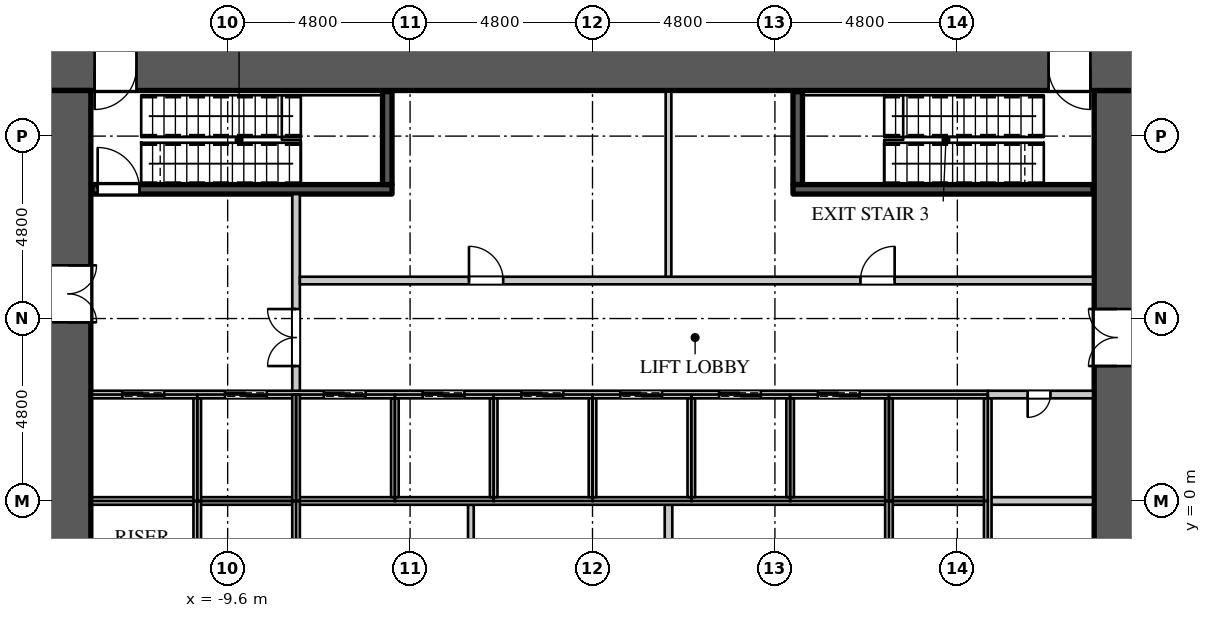
"""IFC4 building model, lengths in metres.
Left out: names, types, materials, properties, quantities, classifications, styles, units other than length and angle.
Written with IfcOpenShell. Run it as: python <this file> out.ifc"""

import sys

from ifc_helpers import new_model, si_unit, direction, frame, frame_2d, origin, place, context, subcontext, project, spatial, rectangle, extrude, element, fill, save


model = new_model("IFC4")
c1 = context("Model", 3, precision=1e-05, world=origin(), true_north=direction((0.0, 1.0)))
c2 = subcontext(c1, "Body", "Model", "MODEL_VIEW")
j1 = project(units=[si_unit("LENGTHUNIT", "METRE"), si_unit("PLANEANGLEUNIT", "RADIAN")], contexts=[c1])
p1 = place(None, origin())
s1 = spatial("IfcSite", under=j1, at=p1, CompositionType="ELEMENT")
p2 = place(p1, origin())
s2 = spatial("IfcBuilding", under=s1, at=p2, CompositionType="ELEMENT")
p3 = place(p2, frame((0.0, 0.0, 16.0)))
s3 = spatial("IfcBuildingStorey", under=s2, at=p3, CompositionType="ELEMENT", Elevation=16.0)
p4 = place(p3, frame((-14.4, 11.4, 0.0), z_axis=(0.0, 0.0, 1.0), x_axis=(1.0, 0.0, 0.0)))
e1 = element("IfcWall", 1, at=p4, inside=s3, PredefinedType="SHEAR", context=c2, shape_type="SweptSolid", body=[
    extrude(rectangle(XDim=28.8, YDim=1.2, at=frame_2d((14.4, 0.0))), origin(), (0.0, 0.0, 1.0), 5.0),
])
p5 = place(p4, frame((1.3, 0.0, 0.0)))
e2 = element("IfcOpeningElement", 2, at=p5, cuts=e1, PredefinedType="OPENING", context=c2, shape_type="SweptSolid", body=[
    extrude(rectangle(XDim=1.1, YDim=2.2, at=frame_2d((0.55, 1.1))), frame((0.0, 0.61, 0.0), z_axis=(0.0, -1.0, 0.0), x_axis=(1.0, 0.0, 0.0)), (0.0, 0.0, 1.0), 1.22),
])
p6 = place(p4, frame((26.4, 0.0, 0.0)))
e3 = element("IfcOpeningElement", 3, at=p6, cuts=e1, PredefinedType="OPENING", context=c2, shape_type="SweptSolid", body=[
    extrude(rectangle(XDim=1.1, YDim=2.2, at=frame_2d((0.55, 1.1))), frame((0.0, 0.61, 0.0), z_axis=(0.0, -1.0, 0.0), x_axis=(1.0, 0.0, 0.0)), (0.0, 0.0, 1.0), 1.22),
])
p7 = place(p3, frame((13.8, -10.8, 0.0), z_axis=(0.0, 0.0, 1.0), x_axis=(0.0, 1.0, 0.0)))
e4 = element("IfcWall", 4, at=p7, inside=s3, PredefinedType="SHEAR", context=c2, shape_type="SweptSolid", body=[
    extrude(rectangle(XDim=21.6, YDim=1.2, at=frame_2d((10.8, 0.0))), origin(), (0.0, 0.0, 1.0), 5.0),
])
p8 = place(p7, frame((14.35, 0.0, 0.0)))
e5 = element("IfcOpeningElement", 5, at=p8, cuts=e4, PredefinedType="OPENING", context=c2, shape_type="SweptSolid", body=[
    extrude(rectangle(XDim=1.5, YDim=2.4, at=frame_2d((0.75, 1.2))), frame((0.0, 0.61, 0.0), z_axis=(0.0, -1.0, 0.0), x_axis=(1.0, 0.0, 0.0)), (0.0, 0.0, 1.0), 1.22),
])
p9 = place(p7, frame((5.75, 0.0, 0.0)))
e6 = element("IfcOpeningElement", 6, at=p9, cuts=e4, PredefinedType="OPENING", context=c2, shape_type="SweptSolid", body=[
    extrude(rectangle(XDim=1.5, YDim=2.4, at=frame_2d((0.75, 1.2))), frame((0.0, 0.61, 0.0), z_axis=(0.0, -1.0, 0.0), x_axis=(1.0, 0.0, 0.0)), (0.0, 0.0, 1.0), 1.22),
])
p10 = place(p3, frame((-13.8, -10.8, 0.0), z_axis=(0.0, 0.0, 1.0), x_axis=(0.0, 1.0, 0.0)))
e7 = element("IfcWall", 7, at=p10, inside=s3, PredefinedType="SHEAR", context=c2, shape_type="SweptSolid", body=[
    extrude(rectangle(XDim=21.6, YDim=1.2, at=frame_2d((10.8, 0.0))), origin(), (0.0, 0.0, 1.0), 5.0),
])
p11 = place(p10, frame((15.5, 0.0, 0.0)))
e8 = element("IfcOpeningElement", 8, at=p11, cuts=e7, PredefinedType="OPENING", context=c2, shape_type="SweptSolid", body=[
    extrude(rectangle(XDim=1.5, YDim=2.4, at=frame_2d((0.75, 1.2))), frame((0.0, 0.61, 0.0), z_axis=(0.0, -1.0, 0.0), x_axis=(1.0, 0.0, 0.0)), (0.0, 0.0, 1.0), 1.22),
])
p12 = place(p10, frame((4.5, 0.0, 0.0)))
e9 = element("IfcOpeningElement", 9, at=p12, cuts=e7, PredefinedType="OPENING", context=c2, shape_type="SweptSolid", body=[
    extrude(rectangle(XDim=1.5, YDim=2.4, at=frame_2d((0.75, 1.2))), frame((0.0, 0.61, 0.0), z_axis=(0.0, -1.0, 0.0), x_axis=(1.0, 0.0, 0.0)), (0.0, 0.0, 1.0), 1.22),
])
p13 = place(p3, frame((-7.8, 2.8, 0.0), z_axis=(0.0, 0.0, 1.0), x_axis=(0.0, 1.0, 0.0)))
e10 = element("IfcWall", 10, at=p13, inside=s3, PredefinedType="PARTITIONING", context=c2, shape_type="SweptSolid", body=[
    extrude(rectangle(XDim=5.275, YDim=0.2, at=frame_2d((2.637, 0.0))), origin(), (0.0, 0.0, 1.0), 4.4),
])
p14 = place(p13, frame((0.75, 0.0, 0.0)))
e11 = element("IfcOpeningElement", 11, at=p14, cuts=e10, PredefinedType="OPENING", context=c2, shape_type="SweptSolid", body=[
    extrude(rectangle(XDim=1.5, YDim=2.4, at=frame_2d((0.75, 1.2))), frame((0.0, 0.11, 0.0), z_axis=(0.0, -1.0, 0.0), x_axis=(1.0, 0.0, 0.0)), (0.0, 0.0, 1.0), 0.22),
])
p15 = place(p3, frame((-7.7, 5.8, 0.0), z_axis=(0.0, 0.0, 1.0), x_axis=(1.0, 0.0, 0.0)))
e12 = element("IfcWall", 12, at=p15, inside=s3, PredefinedType="PARTITIONING", context=c2, shape_type="SweptSolid", body=[
    extrude(rectangle(XDim=20.87, YDim=0.2, at=frame_2d((10.435, 0.0))), origin(), (0.0, 0.0, 1.0), 4.4),
])
p16 = place(p15, frame((4.45, 0.0, 0.0)))
e13 = element("IfcOpeningElement", 13, at=p16, cuts=e12, PredefinedType="OPENING", context=c2, shape_type="SweptSolid", body=[
    extrude(rectangle(XDim=0.9, YDim=2.2, at=frame_2d((0.45, 1.1))), frame((0.0, 0.11, 0.0), z_axis=(0.0, -1.0, 0.0), x_axis=(1.0, 0.0, 0.0)), (0.0, 0.0, 1.0), 0.22),
])
p17 = place(p15, frame((14.75, 0.0, 0.0)))
e14 = element("IfcOpeningElement", 14, at=p17, cuts=e12, PredefinedType="OPENING", context=c2, shape_type="SweptSolid", body=[
    extrude(rectangle(XDim=0.9, YDim=2.2, at=frame_2d((0.45, 1.1))), frame((0.0, 0.11, 0.0), z_axis=(0.0, -1.0, 0.0), x_axis=(1.0, 0.0, 0.0)), (0.0, 0.0, 1.0), 0.22),
])
p18 = place(p3, frame((-3.2, -2.7, 0.0), z_axis=(0.0, 0.0, 1.0), x_axis=(0.0, 1.0, 0.0)))
e15 = element("IfcWall", 15, at=p18, inside=s3, PredefinedType="PARTITIONING", context=c2, shape_type="SweptSolid", body=[
    extrude(rectangle(XDim=2.6, YDim=0.15, at=frame_2d((1.3, 0.0))), origin(), (0.0, 0.0, 1.0), 4.4),
])
p19 = place(p3, frame((2.0, 5.9, 0.0), z_axis=(0.0, 0.0, 1.0), x_axis=(0.0, 1.0, 0.0)))
e16 = element("IfcWall", 16, at=p19, inside=s3, PredefinedType="PARTITIONING", context=c2, shape_type="SweptSolid", body=[
    extrude(rectangle(XDim=4.87, YDim=0.15, at=frame_2d((2.435, 0.0))), origin(), (0.0, 0.0, 1.0), 4.4),
])
p20 = place(p3, frame((2.0, -2.7, 0.0), z_axis=(0.0, 0.0, 1.0), x_axis=(0.0, 1.0, 0.0)))
e17 = element("IfcWall", 17, at=p20, inside=s3, PredefinedType="PARTITIONING", context=c2, shape_type="SweptSolid", body=[
    extrude(rectangle(XDim=2.6, YDim=0.2, at=frame_2d((1.3, 0.0))), origin(), (0.0, 0.0, 1.0), 4.4),
])
p21 = place(p3, frame((10.4, 2.8, 0.0), z_axis=(0.0, 0.0, 1.0), x_axis=(1.0, 0.0, 0.0)))
e18 = element("IfcWall", 18, at=p21, inside=s3, PredefinedType="PARTITIONING", context=c2, shape_type="SweptSolid", body=[
    extrude(rectangle(XDim=2.77, YDim=0.2, at=frame_2d((1.385, 0.0))), origin(), (0.0, 0.0, 1.0), 4.4),
])
p22 = place(p21, frame((1.05, 0.0, 0.0)))
e19 = element("IfcOpeningElement", 19, at=p22, cuts=e18, PredefinedType="OPENING", context=c2, shape_type="SweptSolid", body=[
    extrude(rectangle(XDim=0.6, YDim=2.0, at=frame_2d((0.3, 1.0))), frame((0.0, 0.11, 0.0), z_axis=(0.0, -1.0, 0.0), x_axis=(1.0, 0.0, 0.0)), (0.0, 0.0, 1.0), 0.22),
])
p23 = place(p3, frame((10.4, 0.0, 0.0), z_axis=(0.0, 0.0, 1.0), x_axis=(1.0, 0.0, 0.0)))
e20 = element("IfcWall", 20, at=p23, inside=s3, PredefinedType="PARTITIONING", context=c2, shape_type="SweptSolid", body=[
    extrude(rectangle(XDim=2.77, YDim=0.2, at=frame_2d((1.385, 0.0))), origin(), (0.0, 0.0, 1.0), 4.4),
])
p24 = place(p3, frame((-13.17, 0.0, 0.0), z_axis=(0.0, 0.0, 1.0), x_axis=(1.0, 0.0, 0.0)))
e21 = element("IfcWall", 21, at=p24, inside=s3, PredefinedType="PARTITIONING", context=c2, shape_type="SweptSolid", body=[
    extrude(rectangle(XDim=23.57, YDim=0.2, at=frame_2d((11.785, 0.0))), origin(), (0.0, 0.0, 1.0), 4.4),
])
p25 = place(p3, frame((-13.17, 2.8, 0.0), z_axis=(0.0, 0.0, 1.0), x_axis=(1.0, 0.0, 0.0)))
e22 = element("IfcWall", 22, at=p25, inside=s3, PredefinedType="PARTITIONING", context=c2, shape_type="SweptSolid", body=[
    extrude(rectangle(XDim=23.57, YDim=0.2, at=frame_2d((11.785, 0.0))), origin(), (0.0, 0.0, 1.0), 4.4),
])
p26 = place(p25, frame((0.8, 0.0, 0.0)))
e23 = element("IfcOpeningElement", 23, at=p26, cuts=e22, PredefinedType="OPENING", context=c2, shape_type="SweptSolid", body=[
    extrude(rectangle(XDim=1.1, YDim=2.2, at=frame_2d((0.55, 1.1))), frame((0.0, 0.11, 0.0), z_axis=(0.0, -1.0, 0.0), x_axis=(1.0, 0.0, 0.0)), (0.0, 0.0, 1.0), 0.22),
])
p27 = place(p25, frame((3.5, 0.0, 0.0)))
e24 = element("IfcOpeningElement", 24, at=p27, cuts=e22, PredefinedType="OPENING", context=c2, shape_type="SweptSolid", body=[
    extrude(rectangle(XDim=1.1, YDim=2.2, at=frame_2d((0.55, 1.1))), frame((0.0, 0.11, 0.0), z_axis=(0.0, -1.0, 0.0), x_axis=(1.0, 0.0, 0.0)), (0.0, 0.0, 1.0), 0.22),
])
p28 = place(p25, frame((6.1, 0.0, 0.0)))
e25 = element("IfcOpeningElement", 25, at=p28, cuts=e22, PredefinedType="OPENING", context=c2, shape_type="SweptSolid", body=[
    extrude(rectangle(XDim=1.1, YDim=2.2, at=frame_2d((0.55, 1.1))), frame((0.0, 0.11, 0.0), z_axis=(0.0, -1.0, 0.0), x_axis=(1.0, 0.0, 0.0)), (0.0, 0.0, 1.0), 0.22),
])
p29 = place(p25, frame((8.7, 0.0, 0.0)))
e26 = element("IfcOpeningElement", 26, at=p29, cuts=e22, PredefinedType="OPENING", context=c2, shape_type="SweptSolid", body=[
    extrude(rectangle(XDim=1.1, YDim=2.2, at=frame_2d((0.55, 1.1))), frame((0.0, 0.11, 0.0), z_axis=(0.0, -1.0, 0.0), x_axis=(1.0, 0.0, 0.0)), (0.0, 0.0, 1.0), 0.22),
])
p30 = place(p25, frame((11.3, 0.0, 0.0)))
e27 = element("IfcOpeningElement", 27, at=p30, cuts=e22, PredefinedType="OPENING", context=c2, shape_type="SweptSolid", body=[
    extrude(rectangle(XDim=1.1, YDim=2.2, at=frame_2d((0.55, 1.1))), frame((0.0, 0.11, 0.0), z_axis=(0.0, -1.0, 0.0), x_axis=(1.0, 0.0, 0.0)), (0.0, 0.0, 1.0), 0.22),
])
p31 = place(p25, frame((13.9, 0.0, 0.0)))
e28 = element("IfcOpeningElement", 28, at=p31, cuts=e22, PredefinedType="OPENING", context=c2, shape_type="SweptSolid", body=[
    extrude(rectangle(XDim=1.1, YDim=2.2, at=frame_2d((0.55, 1.1))), frame((0.0, 0.11, 0.0), z_axis=(0.0, -1.0, 0.0), x_axis=(1.0, 0.0, 0.0)), (0.0, 0.0, 1.0), 0.22),
])
p32 = place(p25, frame((16.5, 0.0, 0.0)))
e29 = element("IfcOpeningElement", 29, at=p32, cuts=e22, PredefinedType="OPENING", context=c2, shape_type="SweptSolid", body=[
    extrude(rectangle(XDim=1.1, YDim=2.2, at=frame_2d((0.55, 1.1))), frame((0.0, 0.11, 0.0), z_axis=(0.0, -1.0, 0.0), x_axis=(1.0, 0.0, 0.0)), (0.0, 0.0, 1.0), 0.22),
])
p33 = place(p25, frame((19.1, 0.0, 0.0)))
e30 = element("IfcOpeningElement", 30, at=p33, cuts=e22, PredefinedType="OPENING", context=c2, shape_type="SweptSolid", body=[
    extrude(rectangle(XDim=1.1, YDim=2.2, at=frame_2d((0.55, 1.1))), frame((0.0, 0.11, 0.0), z_axis=(0.0, -1.0, 0.0), x_axis=(1.0, 0.0, 0.0)), (0.0, 0.0, 1.0), 0.22),
])
for number, where, z_axis, x_axis in (
    (31, (-10.4, -2.7, 0.0), (0.0, 0.0, 1.0), (0.0, 1.0, 0.0)),
    (32, (-10.4, 0.0, 0.0), (0.0, 0.0, 1.0), (0.0, 1.0, 0.0)),
):
    element("IfcWall", number, at=place(p3, frame(where, z_axis=z_axis, x_axis=x_axis)), inside=s3, PredefinedType="PARTITIONING", context=c2, shape_type="SweptSolid", body=[
        extrude(rectangle(XDim=2.7, YDim=0.2, at=frame_2d((1.35, 0.0))), origin(), (0.0, 0.0, 1.0), 4.4),
    ])
for number, where, z_axis, x_axis in (
    (33, (-7.8, -2.8, 0.0), (0.0, 0.0, 1.0), (0.0, 1.0, 0.0)),
    (34, (-7.8, 0.0, 0.0), (0.0, 0.0, 1.0), (0.0, 1.0, 0.0)),
):
    element("IfcWall", number, at=place(p3, frame(where, z_axis=z_axis, x_axis=x_axis)), inside=s3, PredefinedType="PARTITIONING", context=c2, shape_type="SweptSolid", body=[
        extrude(rectangle(XDim=2.8, YDim=0.2, at=frame_2d((1.4, 0.0))), origin(), (0.0, 0.0, 1.0), 4.4),
    ])
for number, where, z_axis, x_axis in (
    (35, (-5.2, 0.1, 0.0), (0.0, 0.0, 1.0), (0.0, 1.0, 0.0)),
    (36, (-2.6, 0.1, 0.0), (0.0, 0.0, 1.0), (0.0, 1.0, 0.0)),
    (37, (0.0, 0.1, 0.0), (0.0, 0.0, 1.0), (0.0, 1.0, 0.0)),
    (38, (2.6, 0.1, 0.0), (0.0, 0.0, 1.0), (0.0, 1.0, 0.0)),
    (39, (5.2, 0.1, 0.0), (0.0, 0.0, 1.0), (0.0, 1.0, 0.0)),
):
    element("IfcWall", number, at=place(p3, frame(where, z_axis=z_axis, x_axis=x_axis)), inside=s3, PredefinedType="PARTITIONING", context=c2, shape_type="SweptSolid", body=[
        extrude(rectangle(XDim=2.6, YDim=0.2, at=frame_2d((1.3, 0.0))), origin(), (0.0, 0.0, 1.0), 4.4),
    ])
for number, where, z_axis, x_axis in (
    (40, (7.8, -2.7, 0.0), (0.0, 0.0, 1.0), (0.0, 1.0, 0.0)),
    (41, (7.8, 0.0, 0.0), (0.0, 0.0, 1.0), (0.0, 1.0, 0.0)),
):
    element("IfcWall", number, at=place(p3, frame(where, z_axis=z_axis, x_axis=x_axis)), inside=s3, PredefinedType="PARTITIONING", context=c2, shape_type="SweptSolid", body=[
        extrude(rectangle(XDim=2.7, YDim=0.2, at=frame_2d((1.35, 0.0))), origin(), (0.0, 0.0, 1.0), 4.4),
    ])
p34 = place(p3, frame((10.4, -2.7, 0.0), z_axis=(0.0, 0.0, 1.0), x_axis=(0.0, 1.0, 0.0)))
e42 = element("IfcWall", 42, at=p34, inside=s3, PredefinedType="PARTITIONING", context=c2, shape_type="SweptSolid", body=[
    extrude(rectangle(XDim=5.4, YDim=0.2, at=frame_2d((2.7, 0.0))), origin(), (0.0, 0.0, 1.0), 4.4),
])
p35 = place(p3, frame((-13.17, 8.2, 0.0), z_axis=(0.0, 0.0, 1.0), x_axis=(1.0, 0.0, 0.0)))
e43 = element("IfcWall", 43, at=p35, inside=s3, PredefinedType="SHEAR", context=c2, shape_type="SweptSolid", body=[
    extrude(rectangle(XDim=7.895, YDim=0.25, at=frame_2d((3.948, 0.0))), origin(), (0.0, 0.0, 1.0), 4.65),
])
p36 = place(p35, frame((0.15, 0.0, 0.0)))
e44 = element("IfcOpeningElement", 44, at=p36, cuts=e43, PredefinedType="OPENING", context=c2, shape_type="SweptSolid", body=[
    extrude(rectangle(XDim=1.1, YDim=2.2, at=frame_2d((0.55, 1.1))), frame((0.0, 0.135, 0.0), z_axis=(0.0, -1.0, 0.0), x_axis=(1.0, 0.0, 0.0)), (0.0, 0.0, 1.0), 0.27),
])
for number, where, z_axis, x_axis in (
    (45, (-5.4, 8.325, 0.0), (0.0, 0.0, 1.0), (0.0, 1.0, 0.0)),
    (46, (5.4, 8.325, 0.0), (0.0, 0.0, 1.0), (0.0, 1.0, 0.0)),
):
    element("IfcWall", number, at=place(p3, frame(where, z_axis=z_axis, x_axis=x_axis)), inside=s3, PredefinedType="SHEAR", context=c2, shape_type="SweptSolid", body=[
        extrude(rectangle(XDim=2.445, YDim=0.25, at=frame_2d((1.223, 0.0))), origin(), (0.0, 0.0, 1.0), 4.65),
    ])
p37 = place(p3, frame((5.275, 8.2, 0.0), z_axis=(0.0, 0.0, 1.0), x_axis=(1.0, 0.0, 0.0)))
e47 = element("IfcWall", 47, at=p37, inside=s3, PredefinedType="SHEAR", context=c2, shape_type="SweptSolid", body=[
    extrude(rectangle(XDim=7.895, YDim=0.25, at=frame_2d((3.948, 0.0))), origin(), (0.0, 0.0, 1.0), 4.65),
])
p38 = place(p22, origin())
e48 = element("IfcDoor", 48, at=p38, inside=s3, OperationType="SINGLE_SWING_RIGHT", PredefinedType="DOOR", context=c2, shape_type="SweptSolid", body=[
    extrude(rectangle(XDim=0.6, YDim=2.0, at=frame_2d((0.3, 1.0))), frame((0.0, 0.025, 0.0), z_axis=(0.0, -1.0, 0.0), x_axis=(1.0, 0.0, 0.0)), (0.0, 0.0, 1.0), 0.05),
])
fill(e19, e48)
p39 = place(p16, origin())
e49 = element("IfcDoor", 49, at=p39, inside=s3, OperationType="SINGLE_SWING_LEFT", PredefinedType="DOOR", context=c2, shape_type="SweptSolid", body=[
    extrude(rectangle(XDim=0.9, YDim=2.2, at=frame_2d((0.45, 1.1))), frame((0.0, 0.025, 0.0), z_axis=(0.0, -1.0, 0.0), x_axis=(1.0, 0.0, 0.0)), (0.0, 0.0, 1.0), 0.05),
])
fill(e13, e49)
p40 = place(p17, origin())
e50 = element("IfcDoor", 50, at=p40, inside=s3, OperationType="SINGLE_SWING_RIGHT", PredefinedType="DOOR", context=c2, shape_type="SweptSolid", body=[
    extrude(rectangle(XDim=0.9, YDim=2.2, at=frame_2d((0.45, 1.1))), frame((0.0, 0.025, 0.0), z_axis=(0.0, -1.0, 0.0), x_axis=(1.0, 0.0, 0.0)), (0.0, 0.0, 1.0), 0.05),
])
fill(e14, e50)
p41 = place(p26, origin())
e51 = element("IfcDoor", 51, at=p41, inside=s3, OperationType="DOUBLE_DOOR_SLIDING", PredefinedType="DOOR", context=c2, shape_type="SweptSolid", body=[
    extrude(rectangle(XDim=1.1, YDim=2.2, at=frame_2d((0.55, 1.1))), frame((0.0, 0.025, 0.0), z_axis=(0.0, -1.0, 0.0), x_axis=(1.0, 0.0, 0.0)), (0.0, 0.0, 1.0), 0.05),
])
fill(e23, e51)
p42 = place(p27, origin())
e52 = element("IfcDoor", 52, at=p42, inside=s3, OperationType="DOUBLE_DOOR_SLIDING", PredefinedType="DOOR", context=c2, shape_type="SweptSolid", body=[
    extrude(rectangle(XDim=1.1, YDim=2.2, at=frame_2d((0.55, 1.1))), frame((0.0, 0.025, 0.0), z_axis=(0.0, -1.0, 0.0), x_axis=(1.0, 0.0, 0.0)), (0.0, 0.0, 1.0), 0.05),
])
fill(e24, e52)
p43 = place(p28, origin())
e53 = element("IfcDoor", 53, at=p43, inside=s3, OperationType="DOUBLE_DOOR_SLIDING", PredefinedType="DOOR", context=c2, shape_type="SweptSolid", body=[
    extrude(rectangle(XDim=1.1, YDim=2.2, at=frame_2d((0.55, 1.1))), frame((0.0, 0.025, 0.0), z_axis=(0.0, -1.0, 0.0), x_axis=(1.0, 0.0, 0.0)), (0.0, 0.0, 1.0), 0.05),
])
fill(e25, e53)
p44 = place(p29, origin())
e54 = element("IfcDoor", 54, at=p44, inside=s3, OperationType="DOUBLE_DOOR_SLIDING", PredefinedType="DOOR", context=c2, shape_type="SweptSolid", body=[
    extrude(rectangle(XDim=1.1, YDim=2.2, at=frame_2d((0.55, 1.1))), frame((0.0, 0.025, 0.0), z_axis=(0.0, -1.0, 0.0), x_axis=(1.0, 0.0, 0.0)), (0.0, 0.0, 1.0), 0.05),
])
fill(e26, e54)
p45 = place(p30, origin())
e55 = element("IfcDoor", 55, at=p45, inside=s3, OperationType="DOUBLE_DOOR_SLIDING", PredefinedType="DOOR", context=c2, shape_type="SweptSolid", body=[
    extrude(rectangle(XDim=1.1, YDim=2.2, at=frame_2d((0.55, 1.1))), frame((0.0, 0.025, 0.0), z_axis=(0.0, -1.0, 0.0), x_axis=(1.0, 0.0, 0.0)), (0.0, 0.0, 1.0), 0.05),
])
fill(e27, e55)
p46 = place(p31, origin())
e56 = element("IfcDoor", 56, at=p46, inside=s3, OperationType="DOUBLE_DOOR_SLIDING", PredefinedType="DOOR", context=c2, shape_type="SweptSolid", body=[
    extrude(rectangle(XDim=1.1, YDim=2.2, at=frame_2d((0.55, 1.1))), frame((0.0, 0.025, 0.0), z_axis=(0.0, -1.0, 0.0), x_axis=(1.0, 0.0, 0.0)), (0.0, 0.0, 1.0), 0.05),
])
fill(e28, e56)
p47 = place(p32, origin())
e57 = element("IfcDoor", 57, at=p47, inside=s3, OperationType="DOUBLE_DOOR_SLIDING", PredefinedType="DOOR", context=c2, shape_type="SweptSolid", body=[
    extrude(rectangle(XDim=1.1, YDim=2.2, at=frame_2d((0.55, 1.1))), frame((0.0, 0.025, 0.0), z_axis=(0.0, -1.0, 0.0), x_axis=(1.0, 0.0, 0.0)), (0.0, 0.0, 1.0), 0.05),
])
fill(e29, e57)
p48 = place(p33, origin())
e58 = element("IfcDoor", 58, at=p48, inside=s3, OperationType="DOUBLE_DOOR_SLIDING", PredefinedType="DOOR", context=c2, shape_type="SweptSolid", body=[
    extrude(rectangle(XDim=1.1, YDim=2.2, at=frame_2d((0.55, 1.1))), frame((0.0, 0.025, 0.0), z_axis=(0.0, -1.0, 0.0), x_axis=(1.0, 0.0, 0.0)), (0.0, 0.0, 1.0), 0.05),
])
fill(e30, e58)
p49 = place(p36, origin())
e59 = element("IfcDoor", 59, at=p49, inside=s3, OperationType="SINGLE_SWING_LEFT", PredefinedType="DOOR", context=c2, shape_type="SweptSolid", body=[
    extrude(rectangle(XDim=1.1, YDim=2.2, at=frame_2d((0.55, 1.1))), frame((0.0, 0.025, 0.0), z_axis=(0.0, -1.0, 0.0), x_axis=(1.0, 0.0, 0.0)), (0.0, 0.0, 1.0), 0.05),
])
fill(e44, e59)
p50 = place(p14, origin())
e60 = element("IfcDoor", 60, at=p50, inside=s3, OperationType="DOUBLE_DOOR_SINGLE_SWING", PredefinedType="DOOR", context=c2, shape_type="SweptSolid", body=[
    extrude(rectangle(XDim=1.5, YDim=2.4, at=frame_2d((0.75, 1.2))), frame((0.0, 0.025, 0.0), z_axis=(0.0, -1.0, 0.0), x_axis=(1.0, 0.0, 0.0)), (0.0, 0.0, 1.0), 0.05),
])
fill(e11, e60)
p51 = place(p8, origin())
e61 = element("IfcDoor", 61, at=p51, inside=s3, OperationType="DOUBLE_DOOR_SINGLE_SWING", PredefinedType="DOOR", context=c2, shape_type="SweptSolid", body=[
    extrude(rectangle(XDim=1.5, YDim=2.4, at=frame_2d((0.75, 1.2))), frame((0.0, 0.025, 0.0), z_axis=(0.0, -1.0, 0.0), x_axis=(1.0, 0.0, 0.0)), (0.0, 0.0, 1.0), 0.05),
])
fill(e5, e61)
p52 = place(p11, origin())
e62 = element("IfcDoor", 62, at=p52, inside=s3, OperationType="DOUBLE_DOOR_SINGLE_SWING", PredefinedType="DOOR", context=c2, shape_type="SweptSolid", body=[
    extrude(rectangle(XDim=1.5, YDim=2.4, at=frame_2d((0.75, 1.2))), frame((0.0, 0.025, 0.0), z_axis=(0.0, -1.0, 0.0), x_axis=(1.0, 0.0, 0.0)), (0.0, 0.0, 1.0), 0.05),
])
fill(e8, e62)
p53 = place(p5, origin())
e63 = element("IfcDoor", 63, at=p53, inside=s3, OperationType="SINGLE_SWING_RIGHT", PredefinedType="DOOR", context=c2, shape_type="SweptSolid", body=[
    extrude(rectangle(XDim=1.1, YDim=2.2, at=frame_2d((0.55, 1.1))), frame((0.0, 0.025, 0.0), z_axis=(0.0, -1.0, 0.0), x_axis=(1.0, 0.0, 0.0)), (0.0, 0.0, 1.0), 0.05),
])
fill(e2, e63)
p54 = place(p6, origin())
e64 = element("IfcDoor", 64, at=p54, inside=s3, OperationType="SINGLE_SWING_LEFT", PredefinedType="DOOR", context=c2, shape_type="SweptSolid", body=[
    extrude(rectangle(XDim=1.1, YDim=2.2, at=frame_2d((0.55, 1.1))), frame((0.0, 0.025, 0.0), z_axis=(0.0, -1.0, 0.0), x_axis=(1.0, 0.0, 0.0)), (0.0, 0.0, 1.0), 0.05),
])
fill(e3, e64)
save(model, sys.argv[1])
